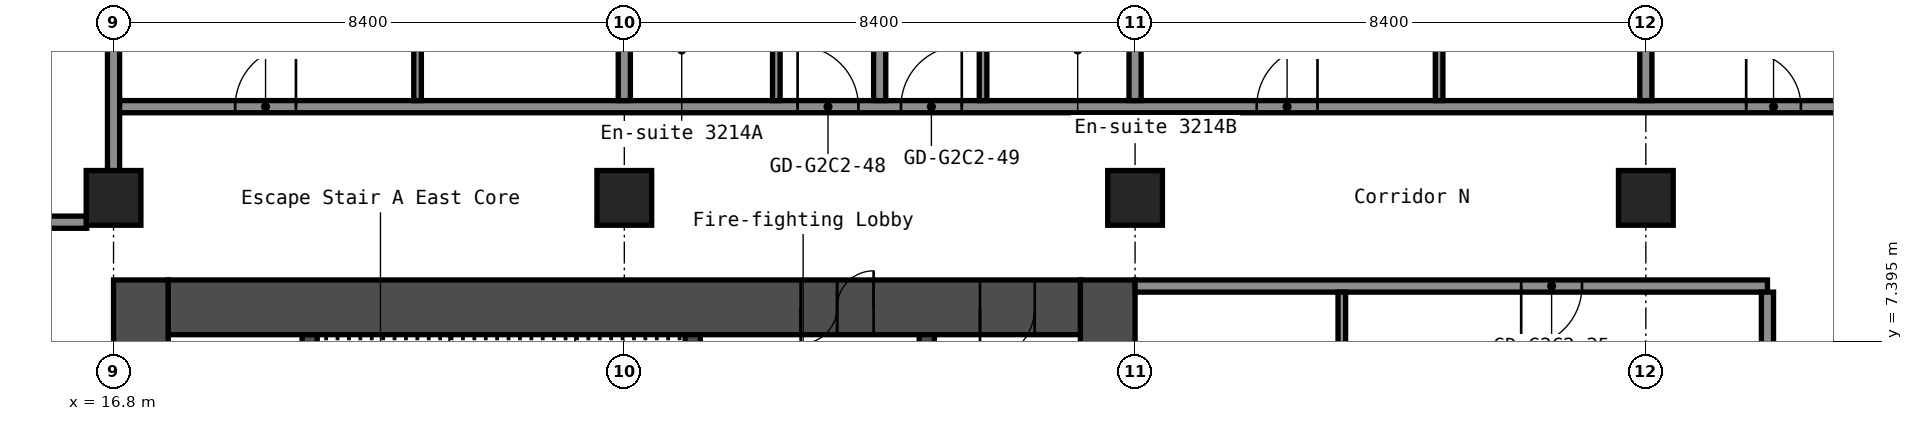
"""IFC4 building model, lengths in metres.
Left out: names, types, materials, properties, quantities, classifications, styles, units other than length and angle.
Written with IfcOpenShell. Run it as: python <this file> out.ifc"""

import sys

from ifc_helpers import new_model, si_unit, direction, frame, frame_2d, origin, origin_2d, place, context, subcontext, project, spatial, rectangle, hollow_rectangle, extrude, element, fill, save


model = new_model("IFC4")
c1 = context("Model", 3, precision=1e-05, world=origin(), true_north=direction((0.0, 1.0)))
c2 = subcontext(c1, "Body", "Model", "MODEL_VIEW")
j1 = project(units=[si_unit("LENGTHUNIT", "METRE"), si_unit("PLANEANGLEUNIT", "RADIAN")], contexts=[c1])
p1 = place(None, origin())
s1 = spatial("IfcSite", under=j1, at=p1, CompositionType="ELEMENT")
p2 = place(p1, origin())
s2 = spatial("IfcBuilding", under=s1, at=p2, CompositionType="ELEMENT")
p3 = place(p2, frame((0.0, 0.0, 113.8)))
s3 = spatial("IfcBuildingStorey", under=s2, at=p3, CompositionType="ELEMENT", Elevation=113.8)
for number, where, z_axis, x_axis in (
    (1, (16.8, 9.75, 0.0), (0.0, 0.0, 1.0), (1.0, 0.0, 0.0)),
    (2, (25.2, 9.75, 0.0), (0.0, 0.0, 1.0), (1.0, 0.0, 0.0)),
    (3, (33.6, 9.75, 0.0), (0.0, 0.0, 1.0), (1.0, 0.0, 0.0)),
    (4, (42.0, 9.75, 0.0), (0.0, 0.0, 1.0), (1.0, 0.0, 0.0)),
):
    element("IfcColumn", number, at=place(p3, frame(where, z_axis=z_axis, x_axis=x_axis)), inside=s3, PredefinedType="COLUMN", context=c2, shape_type="SweptSolid", body=[
        extrude(hollow_rectangle(XDim=0.9, YDim=0.9, WallThickness=0.036, at=origin_2d()), origin(), (0.0, 0.0, 1.0), 2.8),
    ])
p4 = place(p3, frame((17.25, -8.4, 0.0), z_axis=(0.0, 0.0, 1.0), x_axis=(0.0, 1.0, 0.0)))
e5 = element("IfcWall", 5, at=p4, inside=s3, PredefinedType="SHEAR", context=c2, shape_type="SweptSolid", body=[
    extrude(rectangle(XDim=16.8, YDim=0.9, at=frame_2d((8.4, 0.0))), origin(), (0.0, 0.0, 1.0), 2.8),
])
p5 = place(p4, frame((7.6, 0.0, 0.0)))
e6 = element("IfcOpeningElement", 6, at=p5, cuts=e5, PredefinedType="OPENING", context=c2, shape_type="SweptSolid", body=[
    extrude(rectangle(XDim=1.2, YDim=2.1, at=frame_2d((0.6, 1.05))), frame((0.0, 0.46, 0.0), z_axis=(0.0, -1.0, 0.0), x_axis=(1.0, 0.0, 0.0)), (0.0, 0.0, 1.0), 0.92),
])
p6 = place(p3, frame((33.15, -8.4, 0.0), z_axis=(0.0, 0.0, 1.0), x_axis=(0.0, 1.0, 0.0)))
e7 = element("IfcWall", 7, at=p6, inside=s3, PredefinedType="SHEAR", context=c2, shape_type="SweptSolid", body=[
    extrude(rectangle(XDim=16.8, YDim=0.9, at=frame_2d((8.4, 0.0))), origin(), (0.0, 0.0, 1.0), 2.8),
])
p7 = place(p3, frame((17.7, 7.95, 0.0), z_axis=(0.0, 0.0, 1.0), x_axis=(1.0, 0.0, 0.0)))
e8 = element("IfcWall", 8, at=p7, inside=s3, PredefinedType="SHEAR", context=c2, shape_type="SweptSolid", body=[
    extrude(rectangle(XDim=15.0, YDim=0.9, at=frame_2d((7.5, 0.0))), origin(), (0.0, 0.0, 1.0), 2.8),
])
p8 = place(p7, frame((10.4, 0.0, 0.0)))
e9 = element("IfcOpeningElement", 9, at=p8, cuts=e8, PredefinedType="OPENING", context=c2, shape_type="SweptSolid", body=[
    extrude(rectangle(XDim=1.2, YDim=2.1, at=frame_2d((0.6, 1.05))), frame((0.0, 0.46, 0.0), z_axis=(0.0, -1.0, 0.0), x_axis=(1.0, 0.0, 0.0)), (0.0, 0.0, 1.0), 0.92),
])
p9 = place(p7, frame((13.35, 0.0, 0.0)))
e10 = element("IfcOpeningElement", 10, at=p9, cuts=e8, PredefinedType="OPENING", context=c2, shape_type="SweptSolid", body=[
    extrude(rectangle(XDim=0.9, YDim=2.1, at=frame_2d((0.45, 1.05))), frame((0.0, 0.46, 0.0), z_axis=(0.0, -1.0, 0.0), x_axis=(1.0, 0.0, 0.0)), (0.0, 0.0, 1.0), 0.92),
])
p10 = place(p3, frame((20.025, 1.2, 0.0), z_axis=(0.0, 0.0, 1.0), x_axis=(0.0, 1.0, 0.0)))
e11 = element("IfcWall", 11, at=p10, inside=s3, PredefinedType="SHEAR", context=c2, shape_type="SweptSolid", body=[
    extrude(rectangle(XDim=6.3, YDim=0.25, at=frame_2d((3.15, 0.0))), origin(), (0.0, 0.0, 1.0), 2.8),
])
p11 = place(p3, frame((26.325, 3.75, 0.0), z_axis=(0.0, 0.0, 1.0), x_axis=(0.0, 1.0, 0.0)))
e12 = element("IfcWall", 12, at=p11, inside=s3, PredefinedType="SHEAR", context=c2, shape_type="SweptSolid", body=[
    extrude(rectangle(XDim=3.75, YDim=0.25, at=frame_2d((1.875, 0.0))), origin(), (0.0, 0.0, 1.0), 2.8),
])
p12 = place(p11, frame((1.25, 0.0, 0.0)))
e13 = element("IfcOpeningElement", 13, at=p12, cuts=e12, PredefinedType="OPENING", context=c2, shape_type="SweptSolid", body=[
    extrude(rectangle(XDim=1.2, YDim=2.1, at=frame_2d((0.6, 1.05))), frame((0.0, 0.135, 0.0), z_axis=(0.0, -1.0, 0.0), x_axis=(1.0, 0.0, 0.0)), (0.0, 0.0, 1.0), 0.27),
])
p13 = place(p3, frame((30.175, 1.45, 0.0), z_axis=(0.0, 0.0, 1.0), x_axis=(0.0, 1.0, 0.0)))
e14 = element("IfcWall", 14, at=p13, inside=s3, PredefinedType="SHEAR", context=c2, shape_type="SweptSolid", body=[
    extrude(rectangle(XDim=6.05, YDim=0.25, at=frame_2d((3.025, 0.0))), origin(), (0.0, 0.0, 1.0), 2.8),
])
p14 = place(p13, frame((2.625, 0.0, 0.0)))
e15 = element("IfcOpeningElement", 15, at=p14, cuts=e14, PredefinedType="OPENING", context=c2, shape_type="SweptSolid", body=[
    extrude(rectangle(XDim=1.1, YDim=2.1, at=frame_2d((0.55, 1.05))), frame((0.0, 0.135, 0.0), z_axis=(0.0, -1.0, 0.0), x_axis=(1.0, 0.0, 0.0)), (0.0, 0.0, 1.0), 0.27),
])
p15 = place(p3, frame((33.6, 8.3, 0.0), z_axis=(0.0, 0.0, 1.0), x_axis=(1.0, 0.0, 0.0)))
e16 = element("IfcWall", 16, at=p15, inside=s3, PredefinedType="PARTITIONING", context=c2, shape_type="SweptSolid", body=[
    extrude(rectangle(XDim=10.4, YDim=0.2, at=frame_2d((5.2, 0.0))), origin(), (0.0, 0.0, 1.0), 2.8),
])
p16 = place(p15, frame((6.35, 0.0, 0.0)))
e17 = element("IfcOpeningElement", 17, at=p16, cuts=e16, PredefinedType="OPENING", context=c2, shape_type="SweptSolid", body=[
    extrude(rectangle(XDim=1.0, YDim=2.1, at=frame_2d((0.5, 1.05))), frame((0.0, 0.11, 0.0), z_axis=(0.0, -1.0, 0.0), x_axis=(1.0, 0.0, 0.0)), (0.0, 0.0, 1.0), 0.22),
])
p17 = place(p3, frame((-16.36, 9.35, 0.0), z_axis=(0.0, 0.0, 1.0), x_axis=(1.0, 0.0, 0.0)))
e18 = element("IfcWall", 18, at=p17, inside=s3, PredefinedType="PARTITIONING", context=c2, shape_type="SweptSolid", body=[
    extrude(rectangle(XDim=32.72, YDim=0.2, at=frame_2d((16.36, 0.0))), origin(), (0.0, 0.0, 1.0), 2.8),
])
p18 = place(p17, frame((1.56, 0.0, 0.0)))
e19 = element("IfcOpeningElement", 19, at=p18, cuts=e18, PredefinedType="OPENING", context=c2, shape_type="SweptSolid", body=[
    extrude(rectangle(XDim=1.0, YDim=2.1, at=frame_2d((0.5, 1.05))), frame((0.0, 0.11, 0.0), z_axis=(0.0, -1.0, 0.0), x_axis=(1.0, 0.0, 0.0)), (0.0, 0.0, 1.0), 0.22),
])
p19 = place(p17, frame((10.81, 0.0, 0.0)))
e20 = element("IfcOpeningElement", 20, at=p19, cuts=e18, PredefinedType="OPENING", context=c2, shape_type="SweptSolid", body=[
    extrude(rectangle(XDim=1.0, YDim=2.1, at=frame_2d((0.5, 1.05))), frame((0.0, 0.11, 0.0), z_axis=(0.0, -1.0, 0.0), x_axis=(1.0, 0.0, 0.0)), (0.0, 0.0, 1.0), 0.22),
])
p20 = place(p17, frame((12.51, 0.0, 0.0)))
e21 = element("IfcOpeningElement", 21, at=p20, cuts=e18, PredefinedType="OPENING", context=c2, shape_type="SweptSolid", body=[
    extrude(rectangle(XDim=1.0, YDim=2.1, at=frame_2d((0.5, 1.05))), frame((0.0, 0.11, 0.0), z_axis=(0.0, -1.0, 0.0), x_axis=(1.0, 0.0, 0.0)), (0.0, 0.0, 1.0), 0.22),
])
p21 = place(p17, frame((20.06, 0.0, 0.0)))
e22 = element("IfcOpeningElement", 22, at=p21, cuts=e18, PredefinedType="OPENING", context=c2, shape_type="SweptSolid", body=[
    extrude(rectangle(XDim=1.0, YDim=2.1, at=frame_2d((0.5, 1.05))), frame((0.0, 0.11, 0.0), z_axis=(0.0, -1.0, 0.0), x_axis=(1.0, 0.0, 0.0)), (0.0, 0.0, 1.0), 0.22),
])
p22 = place(p17, frame((28.46, 0.0, 0.0)))
e23 = element("IfcOpeningElement", 23, at=p22, cuts=e18, PredefinedType="OPENING", context=c2, shape_type="SweptSolid", body=[
    extrude(rectangle(XDim=1.0, YDim=2.1, at=frame_2d((0.5, 1.05))), frame((0.0, 0.11, 0.0), z_axis=(0.0, -1.0, 0.0), x_axis=(1.0, 0.0, 0.0)), (0.0, 0.0, 1.0), 0.22),
])
p23 = place(p3, frame((16.8, 11.25, 0.0), z_axis=(0.0, 0.0, 1.0), x_axis=(1.0, 0.0, 0.0)))
e24 = element("IfcWall", 24, at=p23, inside=s3, PredefinedType="PARTITIONING", context=c2, shape_type="SweptSolid", body=[
    extrude(rectangle(XDim=29.7, YDim=0.2, at=frame_2d((14.85, 0.0))), origin(), (0.0, 0.0, 1.0), 2.8),
])
p24 = place(p23, frame((2.0, 0.0, 0.0)))
e25 = element("IfcOpeningElement", 25, at=p24, cuts=e24, PredefinedType="OPENING", context=c2, shape_type="SweptSolid", body=[
    extrude(rectangle(XDim=1.0, YDim=2.1, at=frame_2d((0.5, 1.05))), frame((0.0, 0.11, 0.0), z_axis=(0.0, -1.0, 0.0), x_axis=(1.0, 0.0, 0.0)), (0.0, 0.0, 1.0), 0.22),
])
p25 = place(p23, frame((11.25, 0.0, 0.0)))
e26 = element("IfcOpeningElement", 26, at=p25, cuts=e24, PredefinedType="OPENING", context=c2, shape_type="SweptSolid", body=[
    extrude(rectangle(XDim=1.0, YDim=2.1, at=frame_2d((0.5, 1.05))), frame((0.0, 0.11, 0.0), z_axis=(0.0, -1.0, 0.0), x_axis=(1.0, 0.0, 0.0)), (0.0, 0.0, 1.0), 0.22),
])
p26 = place(p23, frame((12.95, 0.0, 0.0)))
e27 = element("IfcOpeningElement", 27, at=p26, cuts=e24, PredefinedType="OPENING", context=c2, shape_type="SweptSolid", body=[
    extrude(rectangle(XDim=1.0, YDim=2.1, at=frame_2d((0.5, 1.05))), frame((0.0, 0.11, 0.0), z_axis=(0.0, -1.0, 0.0), x_axis=(1.0, 0.0, 0.0)), (0.0, 0.0, 1.0), 0.22),
])
p27 = place(p23, frame((18.8, 0.0, 0.0)))
e28 = element("IfcOpeningElement", 28, at=p27, cuts=e24, PredefinedType="OPENING", context=c2, shape_type="SweptSolid", body=[
    extrude(rectangle(XDim=1.0, YDim=2.1, at=frame_2d((0.5, 1.05))), frame((0.0, 0.11, 0.0), z_axis=(0.0, -1.0, 0.0), x_axis=(1.0, 0.0, 0.0)), (0.0, 0.0, 1.0), 0.22),
])
p28 = place(p23, frame((26.85, 0.0, 0.0)))
e29 = element("IfcOpeningElement", 29, at=p28, cuts=e24, PredefinedType="OPENING", context=c2, shape_type="SweptSolid", body=[
    extrude(rectangle(XDim=0.9, YDim=2.1, at=frame_2d((0.45, 1.05))), frame((0.0, 0.11, 0.0), z_axis=(0.0, -1.0, 0.0), x_axis=(1.0, 0.0, 0.0)), (0.0, 0.0, 1.0), 0.22),
])
p29 = place(p3, frame((16.8, 10.19, 0.0), z_axis=(0.0, 0.0, 1.0), x_axis=(0.0, 1.0, 0.0)))
e30 = element("IfcWall", 30, at=p29, inside=s3, PredefinedType="PARTITIONING", context=c2, shape_type="SweptSolid", body=[
    extrude(rectangle(XDim=13.36, YDim=0.2, at=frame_2d((6.68, 0.0))), origin(), (0.0, 0.0, 1.0), 2.8),
])
p30 = place(p3, frame((21.8, 11.35, 0.0), z_axis=(0.0, 0.0, 1.0), x_axis=(0.0, 1.0, 0.0)))
e31 = element("IfcWall", 31, at=p30, inside=s3, PredefinedType="PARTITIONING", context=c2, shape_type="SweptSolid", body=[
    extrude(rectangle(XDim=3.3, YDim=0.125, at=frame_2d((1.65, 0.0))), origin(), (0.0, 0.0, 1.0), 2.8),
])
p31 = place(p3, frame((25.2, 11.35, 0.0), z_axis=(0.0, 0.0, 1.0), x_axis=(0.0, 1.0, 0.0)))
e32 = element("IfcWall", 32, at=p31, inside=s3, PredefinedType="PARTITIONING", context=c2, shape_type="SweptSolid", body=[
    extrude(rectangle(XDim=12.2, YDim=0.2, at=frame_2d((6.1, 0.0))), origin(), (0.0, 0.0, 1.0), 2.8),
])
p32 = place(p3, frame((27.7, 11.35, 0.0), z_axis=(0.0, 0.0, 1.0), x_axis=(0.0, 1.0, 0.0)))
e33 = element("IfcWall", 33, at=p32, inside=s3, PredefinedType="PARTITIONING", context=c2, shape_type="SweptSolid", body=[
    extrude(rectangle(XDim=2.9, YDim=0.125, at=frame_2d((1.45, 0.0))), origin(), (0.0, 0.0, 1.0), 2.8),
])
p33 = place(p32, frame((1.5, 0.0, 0.0)))
e34 = element("IfcOpeningElement", 34, at=p33, cuts=e33, PredefinedType="OPENING", context=c2, shape_type="SweptSolid", body=[
    extrude(rectangle(XDim=0.8, YDim=2.1, at=frame_2d((0.4, 1.05))), frame((0.0, 0.073, 0.0), z_axis=(0.0, -1.0, 0.0), x_axis=(1.0, 0.0, 0.0)), (0.0, 0.0, 1.0), 0.145),
])
p34 = place(p3, frame((29.4, 11.35, 0.0), z_axis=(0.0, 0.0, 1.0), x_axis=(0.0, 1.0, 0.0)))
e35 = element("IfcWall", 35, at=p34, inside=s3, PredefinedType="PARTITIONING", context=c2, shape_type="SweptSolid", body=[
    extrude(rectangle(XDim=12.2, YDim=0.2, at=frame_2d((6.1, 0.0))), origin(), (0.0, 0.0, 1.0), 2.8),
])
p35 = place(p3, frame((31.1, 11.35, 0.0), z_axis=(0.0, 0.0, 1.0), x_axis=(0.0, 1.0, 0.0)))
e36 = element("IfcWall", 36, at=p35, inside=s3, PredefinedType="PARTITIONING", context=c2, shape_type="SweptSolid", body=[
    extrude(rectangle(XDim=2.9, YDim=0.125, at=frame_2d((1.45, 0.0))), origin(), (0.0, 0.0, 1.0), 2.8),
])
p36 = place(p35, frame((1.5, 0.0, 0.0)))
e37 = element("IfcOpeningElement", 37, at=p36, cuts=e36, PredefinedType="OPENING", context=c2, shape_type="SweptSolid", body=[
    extrude(rectangle(XDim=0.8, YDim=2.1, at=frame_2d((0.4, 1.05))), frame((0.0, 0.073, 0.0), z_axis=(0.0, -1.0, 0.0), x_axis=(1.0, 0.0, 0.0)), (0.0, 0.0, 1.0), 0.145),
])
p37 = place(p3, frame((33.6, 11.35, 0.0), z_axis=(0.0, 0.0, 1.0), x_axis=(0.0, 1.0, 0.0)))
e38 = element("IfcWall", 38, at=p37, inside=s3, PredefinedType="PARTITIONING", context=c2, shape_type="SweptSolid", body=[
    extrude(rectangle(XDim=12.2, YDim=0.2, at=frame_2d((6.1, 0.0))), origin(), (0.0, 0.0, 1.0), 2.8),
])
p38 = place(p3, frame((37.0, 4.9, 0.0), z_axis=(0.0, 0.0, 1.0), x_axis=(0.0, 1.0, 0.0)))
e39 = element("IfcWall", 39, at=p38, inside=s3, PredefinedType="PARTITIONING", context=c2, shape_type="SweptSolid", body=[
    extrude(rectangle(XDim=3.3, YDim=0.125, at=frame_2d((1.65, 0.0))), origin(), (0.0, 0.0, 1.0), 2.8),
])
p39 = place(p3, frame((38.6, 11.35, 0.0), z_axis=(0.0, 0.0, 1.0), x_axis=(0.0, 1.0, 0.0)))
e40 = element("IfcWall", 40, at=p39, inside=s3, PredefinedType="PARTITIONING", context=c2, shape_type="SweptSolid", body=[
    extrude(rectangle(XDim=3.3, YDim=0.125, at=frame_2d((1.65, 0.0))), origin(), (0.0, 0.0, 1.0), 2.8),
])
p40 = place(p3, frame((42.0, 11.35, 0.0), z_axis=(0.0, 0.0, 1.0), x_axis=(0.0, 1.0, 0.0)))
e41 = element("IfcWall", 41, at=p40, inside=s3, PredefinedType="PARTITIONING", context=c2, shape_type="SweptSolid", body=[
    extrude(rectangle(XDim=12.2, YDim=0.2, at=frame_2d((6.1, 0.0))), origin(), (0.0, 0.0, 1.0), 2.8),
])
p41 = place(p3, frame((44.0, -8.2, 0.0), z_axis=(0.0, 0.0, 1.0), x_axis=(0.0, 1.0, 0.0)))
e42 = element("IfcWall", 42, at=p41, inside=s3, PredefinedType="PARTITIONING", context=c2, shape_type="SweptSolid", body=[
    extrude(rectangle(XDim=16.4, YDim=0.2, at=frame_2d((8.2, 0.0))), origin(), (0.0, 0.0, 1.0), 2.8),
])
p42 = place(p8, origin())
e43 = element("IfcDoor", 43, at=p42, inside=s3, OperationType="DOUBLE_DOOR_SINGLE_SWING", PredefinedType="DOOR", context=c2, shape_type="SweptSolid", body=[
    extrude(rectangle(XDim=1.2, YDim=2.1, at=frame_2d((0.6, 1.05))), frame((0.0, 0.025, 0.0), z_axis=(0.0, -1.0, 0.0), x_axis=(1.0, 0.0, 0.0)), (0.0, 0.0, 1.0), 0.05),
])
fill(e9, e43)
p43 = place(p9, origin())
e44 = element("IfcDoor", 44, at=p43, inside=s3, OperationType="SINGLE_SWING_LEFT", PredefinedType="DOOR", context=c2, shape_type="SweptSolid", body=[
    extrude(rectangle(XDim=0.9, YDim=2.1, at=frame_2d((0.45, 1.05))), frame((0.0, 0.025, 0.0), z_axis=(0.0, -1.0, 0.0), x_axis=(1.0, 0.0, 0.0)), (0.0, 0.0, 1.0), 0.05),
])
fill(e10, e44)
p44 = place(p16, origin())
e45 = element("IfcDoor", 45, at=p44, inside=s3, OperationType="SINGLE_SWING_LEFT", PredefinedType="DOOR", context=c2, shape_type="SweptSolid", body=[
    extrude(rectangle(XDim=1.0, YDim=2.1, at=frame_2d((0.5, 1.05))), frame((0.0, 0.025, 0.0), z_axis=(0.0, -1.0, 0.0), x_axis=(1.0, 0.0, 0.0)), (0.0, 0.0, 1.0), 0.05),
])
fill(e17, e45)
p45 = place(p24, origin())
e46 = element("IfcDoor", 46, at=p45, inside=s3, OperationType="SINGLE_SWING_LEFT", PredefinedType="DOOR", context=c2, shape_type="SweptSolid", body=[
    extrude(rectangle(XDim=1.0, YDim=2.1, at=frame_2d((0.5, 1.05))), frame((0.0, 0.025, 0.0), z_axis=(0.0, -1.0, 0.0), x_axis=(1.0, 0.0, 0.0)), (0.0, 0.0, 1.0), 0.05),
])
fill(e25, e46)
p46 = place(p25, origin())
e47 = element("IfcDoor", 47, at=p46, inside=s3, OperationType="SINGLE_SWING_RIGHT", PredefinedType="DOOR", context=c2, shape_type="SweptSolid", body=[
    extrude(rectangle(XDim=1.0, YDim=2.1, at=frame_2d((0.5, 1.05))), frame((0.0, 0.025, 0.0), z_axis=(0.0, -1.0, 0.0), x_axis=(1.0, 0.0, 0.0)), (0.0, 0.0, 1.0), 0.05),
])
fill(e26, e47)
p47 = place(p26, origin())
e48 = element("IfcDoor", 48, at=p47, inside=s3, OperationType="SINGLE_SWING_LEFT", PredefinedType="DOOR", context=c2, shape_type="SweptSolid", body=[
    extrude(rectangle(XDim=1.0, YDim=2.1, at=frame_2d((0.5, 1.05))), frame((0.0, 0.025, 0.0), z_axis=(0.0, -1.0, 0.0), x_axis=(1.0, 0.0, 0.0)), (0.0, 0.0, 1.0), 0.05),
])
fill(e27, e48)
p48 = place(p27, origin())
e49 = element("IfcDoor", 49, at=p48, inside=s3, OperationType="SINGLE_SWING_LEFT", PredefinedType="DOOR", context=c2, shape_type="SweptSolid", body=[
    extrude(rectangle(XDim=1.0, YDim=2.1, at=frame_2d((0.5, 1.05))), frame((0.0, 0.025, 0.0), z_axis=(0.0, -1.0, 0.0), x_axis=(1.0, 0.0, 0.0)), (0.0, 0.0, 1.0), 0.05),
])
fill(e28, e49)
p49 = place(p28, origin())
e50 = element("IfcDoor", 50, at=p49, inside=s3, OperationType="SINGLE_SWING_RIGHT", PredefinedType="DOOR", context=c2, shape_type="SweptSolid", body=[
    extrude(rectangle(XDim=0.9, YDim=2.1, at=frame_2d((0.45, 1.05))), frame((0.0, 0.025, 0.0), z_axis=(0.0, -1.0, 0.0), x_axis=(1.0, 0.0, 0.0)), (0.0, 0.0, 1.0), 0.05),
])
fill(e29, e50)
save(model, sys.argv[1])
